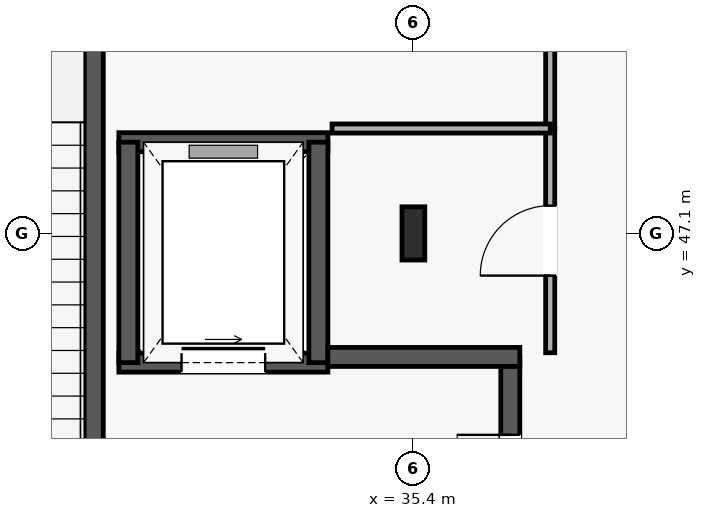
"""IFC4 building model, lengths in metres.
Left out: names, types, materials, properties, quantities, classifications, styles, units other than length and angle.
Written with IfcOpenShell. Run it as: python <this file> out.ifc"""

import sys

from ifc_helpers import new_model, si_unit, direction, frame, frame_2d, origin, origin_2d, place, context, subcontext, project, spatial, rectangle, i_section, extrude, element, fill, save


model = new_model("IFC4")
c1 = context("Model", 3, precision=1e-05, world=origin(), true_north=direction((0.0, 1.0)))
c2 = subcontext(c1, "Body", "Model", "MODEL_VIEW")
j1 = project(units=[si_unit("LENGTHUNIT", "METRE"), si_unit("PLANEANGLEUNIT", "RADIAN")], contexts=[c1])
p1 = place(None, origin())
s1 = spatial("IfcSite", under=j1, at=p1, CompositionType="ELEMENT")
p2 = place(p1, origin())
s2 = spatial("IfcBuilding", under=s1, at=p2, CompositionType="ELEMENT")
p3 = place(p2, frame((0.0, 0.0, 15.0)))
s3 = spatial("IfcBuildingStorey", under=s2, at=p3, CompositionType="ELEMENT", Elevation=15.0)
p4 = place(p3, frame((35.4, 47.1, 0.0), z_axis=(0.0, 0.0, 1.0), x_axis=(1.0, 0.0, 0.0)))
e1 = element("IfcColumn", 1, at=p4, inside=s3, PredefinedType="COLUMN", context=c2, shape_type="SweptSolid", body=[
    extrude(i_section(OverallWidth=0.3, OverallDepth=0.7, WebThickness=0.017, FlangeThickness=0.032, at=origin_2d()), origin(), (0.0, 0.0, 1.0), 4.8),
])
p5 = place(p3, frame((31.195, 41.875, 0.0), z_axis=(0.0, 0.0, 1.0), x_axis=(0.0, 1.0, 0.0)))
e2 = element("IfcWall", 2, at=p5, inside=s3, PredefinedType="SHEAR", context=c2, shape_type="SweptSolid", body=[
    extrude(rectangle(XDim=10.85, YDim=0.25, at=frame_2d((5.425, 0.0))), origin(), (0.0, 0.0, 1.0), 4.5),
])
p6 = place(p5, frame((0.52, 0.0, 0.0)))
e3 = element("IfcOpeningElement", 3, at=p6, cuts=e2, PredefinedType="OPENING", context=c2, shape_type="SweptSolid", body=[
    extrude(rectangle(XDim=1.4, YDim=2.15, at=frame_2d((0.7, 1.075))), frame((0.0, 0.135, 0.0), z_axis=(0.0, -1.0, 0.0), x_axis=(1.0, 0.0, 0.0)), (0.0, 0.0, 1.0), 0.27),
])
p7 = place(p3, frame((31.525, 45.4, 0.0), z_axis=(0.0, 0.0, 1.0), x_axis=(1.0, 0.0, 0.0)))
e4 = element("IfcWall", 4, at=p7, inside=s3, PredefinedType="SHEAR", context=c2, shape_type="SweptSolid", body=[
    extrude(rectangle(XDim=2.75, YDim=0.25, at=frame_2d((1.375, 0.0))), origin(), (0.0, 0.0, 1.0), 4.5),
])
p8 = place(p7, frame((0.825, 0.0, 0.0)))
e5 = element("IfcOpeningElement", 5, at=p8, cuts=e4, PredefinedType="OPENING", context=c2, shape_type="SweptSolid", body=[
    extrude(rectangle(XDim=1.1, YDim=2.15, at=frame_2d((0.55, 1.075))), frame((0.0, 0.135, 0.0), z_axis=(0.0, -1.0, 0.0), x_axis=(1.0, 0.0, 0.0)), (0.0, 0.0, 1.0), 0.27),
])
p9 = place(p3, frame((34.275, 48.3, 0.0), z_axis=(0.0, 0.0, 1.0), x_axis=(-1.0, 0.0, 0.0)))
e6 = element("IfcWall", 6, at=p9, inside=s3, PredefinedType="SHEAR", context=c2, shape_type="SweptSolid", body=[
    extrude(rectangle(XDim=2.75, YDim=0.25, at=frame_2d((1.375, 0.0))), origin(), (0.0, 0.0, 1.0), 4.5),
])
for number, where, z_axis, x_axis in (
    (7, (31.65, 48.3, 0.0), (0.0, 0.0, 1.0), (0.0, -1.0, 0.0)),
    (8, (34.15, 45.4, 0.0), (0.0, 0.0, 1.0), (0.0, 1.0, 0.0)),
):
    element("IfcWall", number, at=place(p3, frame(where, z_axis=z_axis, x_axis=x_axis)), inside=s3, PredefinedType="SHEAR", context=c2, shape_type="SweptSolid", body=[
        extrude(rectangle(XDim=2.9, YDim=0.25, at=frame_2d((1.45, 0.0))), origin(), (0.0, 0.0, 1.0), 4.5),
    ])
p10 = place(p3, frame((36.675, 42.025, 0.0), z_axis=(0.0, 0.0, 1.0), x_axis=(0.0, 1.0, 0.0)))
e9 = element("IfcWall", 9, at=p10, inside=s3, PredefinedType="SHEAR", context=c2, shape_type="SweptSolid", body=[
    extrude(rectangle(XDim=3.45, YDim=0.25, at=frame_2d((1.725, 0.0))), origin(), (0.0, 0.0, 1.0), 4.5),
])
p11 = place(p10, frame((1.025, 0.0, 0.0)))
e10 = element("IfcOpeningElement", 10, at=p11, cuts=e9, PredefinedType="OPENING", context=c2, shape_type="SweptSolid", body=[
    extrude(rectangle(XDim=1.4, YDim=2.15, at=frame_2d((0.7, 1.075))), frame((0.0, 0.135, 0.0), z_axis=(0.0, -1.0, 0.0), x_axis=(1.0, 0.0, 0.0)), (0.0, 0.0, 1.0), 0.27),
])
p12 = place(p3, frame((34.275, 45.475, 0.0), z_axis=(0.0, 0.0, 1.0), x_axis=(1.0, 0.0, 0.0)))
e11 = element("IfcWall", 11, at=p12, inside=s3, PredefinedType="SHEAR", context=c2, shape_type="SweptSolid", body=[
    extrude(rectangle(XDim=2.525, YDim=0.25, at=frame_2d((1.263, 0.0))), origin(), (0.0, 0.0, 1.0), 4.5),
])
p13 = place(p3, frame((37.2, 48.48, 0.0), z_axis=(0.0, 0.0, 1.0), x_axis=(0.0, 1.0, 0.0)))
e12 = element("IfcWall", 12, at=p13, inside=s3, PredefinedType="PARTITIONING", context=c2, shape_type="SweptSolid", body=[
    extrude(rectangle(XDim=4.45, YDim=0.12, at=frame_2d((2.225, 0.0))), origin(), (0.0, 0.0, 1.0), 4.5),
])
p14 = place(p13, frame((1.745, 0.0, 0.0)))
e13 = element("IfcOpeningElement", 13, at=p14, cuts=e12, PredefinedType="OPENING", context=c2, shape_type="SweptSolid", body=[
    extrude(rectangle(XDim=0.96, YDim=2.1, at=frame_2d((0.48, 1.05))), frame((0.0, 0.07, 0.0), z_axis=(0.0, -1.0, 0.0), x_axis=(1.0, 0.0, 0.0)), (0.0, 0.0, 1.0), 0.14),
])
p15 = place(p3, frame((37.2, 45.53, 0.0), z_axis=(0.0, 0.0, 1.0), x_axis=(0.0, 1.0, 0.0)))
e14 = element("IfcWall", 14, at=p15, inside=s3, PredefinedType="PARTITIONING", context=c2, shape_type="SweptSolid", body=[
    extrude(rectangle(XDim=2.95, YDim=0.12, at=frame_2d((1.475, 0.0))), origin(), (0.0, 0.0, 1.0), 4.5),
])
p16 = place(p15, frame((1.015, 0.0, 0.0)))
e15 = element("IfcOpeningElement", 15, at=p16, cuts=e14, PredefinedType="OPENING", context=c2, shape_type="SweptSolid", body=[
    extrude(rectangle(XDim=0.92, YDim=2.1, at=frame_2d((0.46, 1.05))), frame((0.0, 0.07, 0.0), z_axis=(0.0, -1.0, 0.0), x_axis=(1.0, 0.0, 0.0)), (0.0, 0.0, 1.0), 0.14),
])
p17 = place(p3, frame((37.2, 48.48, 0.0), z_axis=(0.0, 0.0, 1.0), x_axis=(-1.0, 0.0, 0.0)))
e16 = element("IfcWall", 16, at=p17, inside=s3, PredefinedType="PARTITIONING", context=c2, shape_type="SweptSolid", body=[
    extrude(rectangle(XDim=2.87, YDim=0.12, at=frame_2d((1.435, 0.0))), origin(), (0.0, 0.0, 1.0), 4.5),
])
p18 = place(p8, origin())
e17 = element("IfcDoor", 17, at=p18, inside=s3, OperationType="SLIDING_TO_LEFT", PredefinedType="DOOR", context=c2, shape_type="SweptSolid", body=[
    extrude(rectangle(XDim=1.1, YDim=2.15, at=frame_2d((0.55, 1.075))), frame((0.0, 0.025, 0.0), z_axis=(0.0, -1.0, 0.0), x_axis=(1.0, 0.0, 0.0)), (0.0, 0.0, 1.0), 0.05),
])
fill(e5, e17)
p19 = place(p11, origin())
e18 = element("IfcDoor", 18, at=p19, inside=s3, OperationType="DOUBLE_DOOR_SINGLE_SWING", PredefinedType="DOOR", context=c2, shape_type="SweptSolid", body=[
    extrude(rectangle(XDim=1.4, YDim=2.15, at=frame_2d((0.7, 1.075))), frame((0.0, 0.025, 0.0), z_axis=(0.0, -1.0, 0.0), x_axis=(1.0, 0.0, 0.0)), (0.0, 0.0, 1.0), 0.05),
])
fill(e10, e18)
p20 = place(p16, origin())
e19 = element("IfcDoor", 19, at=p20, inside=s3, OperationType="SINGLE_SWING_LEFT", PredefinedType="DOOR", context=c2, shape_type="SweptSolid", body=[
    extrude(rectangle(XDim=0.92, YDim=2.1, at=frame_2d((0.46, 1.05))), frame((0.0, 0.025, 0.0), z_axis=(0.0, -1.0, 0.0), x_axis=(1.0, 0.0, 0.0)), (0.0, 0.0, 1.0), 0.05),
])
fill(e15, e19)
save(model, sys.argv[1])
